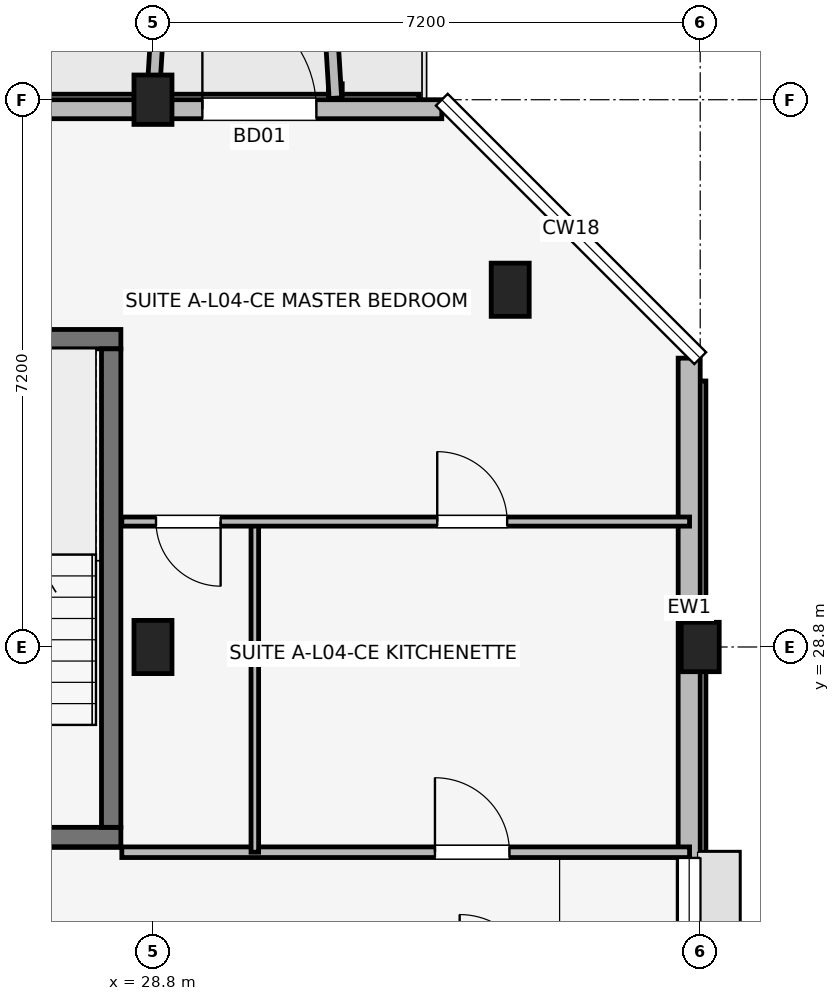
"""IFC4 building model, lengths in metres.
Left out: names, types, materials, properties, quantities, classifications, styles, units other than length and angle.
Written with IfcOpenShell. Run it as: python <this file> out.ifc"""

import sys

from ifc_helpers import new_model, si_unit, direction, frame, frame_2d, origin, origin_2d, place, context, subcontext, project, spatial, rectangle, extrude, element, fill, save


model = new_model("IFC4")
c1 = context("Model", 3, precision=1e-05, world=origin(), true_north=direction((0.0, 1.0)))
c2 = subcontext(c1, "Body", "Model", "MODEL_VIEW")
j1 = project(units=[si_unit("LENGTHUNIT", "METRE"), si_unit("PLANEANGLEUNIT", "RADIAN")], contexts=[c1])
p1 = place(None, origin())
s1 = spatial("IfcSite", under=j1, at=p1, CompositionType="ELEMENT")
p2 = place(p1, origin())
s2 = spatial("IfcBuilding", under=s1, at=p2, CompositionType="ELEMENT")
p3 = place(p2, frame((0.0, 0.0, 15.0)))
s3 = spatial("IfcBuildingStorey", under=s2, at=p3, CompositionType="ELEMENT", Elevation=15.0)
p4 = place(p3, frame((28.8, 28.8, 0.0), z_axis=(0.0, 0.0, 1.0), x_axis=(1.0, 0.0, 0.0)))
e1 = element("IfcColumn", 1, at=p4, inside=s3, PredefinedType="COLUMN", context=c2, shape_type="SweptSolid", body=[
    extrude(rectangle(XDim=0.5, YDim=0.7, at=origin_2d()), origin(), (0.0, 0.0, 1.0), 3.15),
])
for number, where, z_axis, x_axis in (
    (2, (28.8, 36.0, 0.0), (0.0, 0.0, 1.0), (1.0, 0.0, 0.0)),
    (3, (36.0, 28.8, 0.0), (0.0, 0.0, 1.0), (1.0, 0.0, 0.0)),
):
    element("IfcColumn", number, at=place(p3, frame(where, z_axis=z_axis, x_axis=x_axis)), inside=s3, PredefinedType="COLUMN", context=c2, shape_type="SweptSolid", body=[
        extrude(rectangle(XDim=0.5, YDim=0.65, at=origin_2d()), origin(), (0.0, 0.0, 1.0), 3.15),
    ])
p5 = place(p3, frame((33.5, 33.5, 0.0), z_axis=(0.0, 0.0, 1.0), x_axis=(1.0, 0.0, 0.0)))
e4 = element("IfcColumn", 4, at=p5, inside=s3, PredefinedType="COLUMN", context=c2, shape_type="SweptSolid", body=[
    extrude(rectangle(XDim=0.5, YDim=0.7, at=origin_2d()), origin(), (0.0, 0.0, 1.0), 3.15),
])
p6 = place(p3, frame((25.073, 26.3, 0.0), z_axis=(0.0, 0.0, 1.0), x_axis=(1.0, 0.0, 0.0)))
e5 = element("IfcWall", 5, at=p6, inside=s3, PredefinedType="SHEAR", context=c2, shape_type="SweptSolid", body=[
    extrude(rectangle(XDim=3.305, YDim=0.255, at=frame_2d((1.652, 0.0))), origin(), (0.0, 0.0, 1.0), 3.15),
])
p7 = place(p6, frame((1.127, 0.0, 0.0)))
e6 = element("IfcOpeningElement", 6, at=p7, cuts=e5, PredefinedType="OPENING", context=c2, shape_type="SweptSolid", body=[
    extrude(rectangle(XDim=1.05, YDim=2.12, at=frame_2d((0.525, 1.06))), frame((0.0, 0.137, 0.0), z_axis=(0.0, -1.0, 0.0), x_axis=(1.0, 0.0, 0.0)), (0.0, 0.0, 1.0), 0.275),
])
p8 = place(p3, frame((25.073, 32.85, 0.0), z_axis=(0.0, 0.0, 1.0), x_axis=(1.0, 0.0, 0.0)))
e7 = element("IfcWall", 7, at=p8, inside=s3, PredefinedType="SHEAR", context=c2, shape_type="SweptSolid", body=[
    extrude(rectangle(XDim=3.305, YDim=0.255, at=frame_2d((1.652, 0.0))), origin(), (0.0, 0.0, 1.0), 3.15),
])
p9 = place(p3, frame((28.25, 26.427, 0.0), z_axis=(0.0, 0.0, 1.0), x_axis=(0.0, 1.0, 0.0)))
e8 = element("IfcWall", 8, at=p9, inside=s3, PredefinedType="SHEAR", context=c2, shape_type="SweptSolid", body=[
    extrude(rectangle(XDim=6.295, YDim=0.255, at=frame_2d((3.147, 0.0))), origin(), (0.0, 0.0, 1.0), 3.15),
])
p10 = place(p3, frame((35.855, 17.8, 0.0), z_axis=(0.0, 0.0, 1.0), x_axis=(0.0, 1.0, 0.0)))
e9 = element("IfcWall", 9, at=p10, inside=s3, PredefinedType="SOLIDWALL", context=c2, shape_type="SweptSolid", body=[
    extrude(rectangle(XDim=14.8, YDim=0.29, at=frame_2d((7.4, 0.0))), origin(), (0.0, 0.0, 1.0), 2.38),
])
p11 = place(p10, frame((6.575, 0.0, 1.05)))
e10 = element("IfcOpeningElement", 10, at=p11, cuts=e9, PredefinedType="OPENING", context=c2, shape_type="SweptSolid", body=[
    extrude(rectangle(XDim=1.65, YDim=1.15, at=frame_2d((0.825, 0.575))), frame((0.0, 0.155, 0.0), z_axis=(0.0, -1.0, 0.0), x_axis=(1.0, 0.0, 0.0)), (0.0, 0.0, 1.0), 0.31),
])
p12 = place(p10, frame((0.84, 0.0, 0.72)))
e11 = element("IfcOpeningElement", 11, at=p12, cuts=e9, PredefinedType="OPENING", context=c2, shape_type="SweptSolid", body=[
    extrude(rectangle(XDim=1.3, YDim=1.55, at=frame_2d((0.65, 0.775))), frame((0.0, 0.155, 0.0), z_axis=(0.0, -1.0, 0.0), x_axis=(1.0, 0.0, 0.0)), (0.0, 0.0, 1.0), 0.31),
])
p13 = place(p3, frame((32.6, 35.875, 0.0), z_axis=(0.0, 0.0, 1.0), x_axis=(-1.0, 0.0, 0.0)))
e12 = element("IfcWall", 12, at=p13, inside=s3, PredefinedType="SOLIDWALL", context=c2, shape_type="SweptSolid", body=[
    extrude(rectangle(XDim=29.2, YDim=0.25, at=frame_2d((14.6, 0.0))), origin(), (0.0, 0.0, 1.0), 2.43),
])
p14 = place(p13, frame((27.55, 0.0, 0.0), z_axis=(0.0, 0.0, 1.0), x_axis=(-1.0, 0.0, 0.0)))
e13 = element("IfcOpeningElement", 13, at=p14, cuts=e12, PredefinedType="OPENING", context=c2, shape_type="SweptSolid", body=[
    extrude(rectangle(XDim=1.5, YDim=2.15, at=frame_2d((0.75, 1.075))), frame((0.0, 0.135, 0.0), z_axis=(0.0, -1.0, 0.0), x_axis=(1.0, 0.0, 0.0)), (0.0, 0.0, 1.0), 0.27),
])
p15 = place(p13, frame((3.15, 0.0, 0.0), z_axis=(0.0, 0.0, 1.0), x_axis=(-1.0, 0.0, 0.0)))
e14 = element("IfcOpeningElement", 14, at=p15, cuts=e12, PredefinedType="OPENING", context=c2, shape_type="SweptSolid", body=[
    extrude(rectangle(XDim=1.5, YDim=2.15, at=frame_2d((0.75, 1.075))), frame((0.0, 0.135, 0.0), z_axis=(0.0, -1.0, 0.0), x_axis=(1.0, 0.0, 0.0)), (0.0, 0.0, 1.0), 0.27),
])
p16 = place(p13, frame((14.15, 0.0, 0.5)))
e15 = element("IfcOpeningElement", 15, at=p16, cuts=e12, PredefinedType="OPENING", context=c2, shape_type="SweptSolid", body=[
    extrude(rectangle(XDim=0.9, YDim=1.8, at=frame_2d((0.45, 0.9))), frame((0.0, 0.135, 0.0), z_axis=(0.0, -1.0, 0.0), x_axis=(1.0, 0.0, 0.0)), (0.0, 0.0, 1.0), 0.27),
])
p17 = place(p13, frame((8.725, 0.0, 0.7)))
e16 = element("IfcOpeningElement", 16, at=p17, cuts=e12, PredefinedType="OPENING", context=c2, shape_type="SweptSolid", body=[
    extrude(rectangle(XDim=1.86, YDim=1.6, at=frame_2d((0.93, 0.8))), frame((0.0, 0.135, 0.0), z_axis=(0.0, -1.0, 0.0), x_axis=(1.0, 0.0, 0.0)), (0.0, 0.0, 1.0), 0.27),
])
p18 = place(p13, frame((18.755, 0.0, 0.7)))
e17 = element("IfcOpeningElement", 17, at=p18, cuts=e12, PredefinedType="OPENING", context=c2, shape_type="SweptSolid", body=[
    extrude(rectangle(XDim=1.58, YDim=1.6, at=frame_2d((0.79, 0.8))), frame((0.0, 0.135, 0.0), z_axis=(0.0, -1.0, 0.0), x_axis=(1.0, 0.0, 0.0)), (0.0, 0.0, 1.0), 0.27),
])
for number, where, z_axis, x_axis in (
    (18, (28.8, 36.02, 0.0), (0.0, 0.0, 1.0), (0.061, 0.998, 0.0)),
    (19, (31.2, 36.02, 0.0), (0.0, 0.0, 1.0), (-0.061, 0.998, 0.0)),
):
    element("IfcWall", number, at=place(p3, frame(where, z_axis=z_axis, x_axis=x_axis)), inside=s3, PredefinedType="ELEMENTEDWALL", context=c2, shape_type="SweptSolid", body=[
        extrude(rectangle(XDim=1.964, YDim=0.165, at=frame_2d((0.982, 0.0))), origin(), (0.0, 0.0, 1.0), 2.95),
    ])
p19 = place(p3, frame((28.39, 26.1, 0.0), z_axis=(0.0, 0.0, 1.0), x_axis=(1.0, 0.0, 0.0)))
e20 = element("IfcWall", 20, at=p19, inside=s3, PredefinedType="PARTITIONING", context=c2, shape_type="SweptSolid", body=[
    extrude(rectangle(XDim=7.47, YDim=0.14, at=frame_2d((3.735, 0.0))), origin(), (0.0, 0.0, 1.0), 2.38),
])
p20 = place(p19, frame((4.12, 0.0, 0.0)))
e21 = element("IfcOpeningElement", 21, at=p20, cuts=e20, PredefinedType="OPENING", context=c2, shape_type="SweptSolid", body=[
    extrude(rectangle(XDim=0.98, YDim=2.1, at=frame_2d((0.49, 1.05))), frame((0.0, 0.08, 0.0), z_axis=(0.0, -1.0, 0.0), x_axis=(1.0, 0.0, 0.0)), (0.0, 0.0, 1.0), 0.16),
])
p21 = place(p3, frame((30.14, 26.1, 0.0), z_axis=(0.0, 0.0, 1.0), x_axis=(0.0, 1.0, 0.0)))
e22 = element("IfcWall", 22, at=p21, inside=s3, PredefinedType="PARTITIONING", context=c2, shape_type="SweptSolid", body=[
    extrude(rectangle(XDim=4.35, YDim=0.1, at=frame_2d((2.175, 0.0))), origin(), (0.0, 0.0, 1.0), 2.375),
])
p22 = place(p3, frame((28.39, 30.45, 0.0), z_axis=(0.0, 0.0, 1.0), x_axis=(1.0, 0.0, 0.0)))
e23 = element("IfcWall", 23, at=p22, inside=s3, PredefinedType="PARTITIONING", context=c2, shape_type="SweptSolid", body=[
    extrude(rectangle(XDim=7.47, YDim=0.12, at=frame_2d((3.735, 0.0))), origin(), (0.0, 0.0, 1.0), 2.38),
])
p23 = place(p22, frame((1.3, 0.0, 0.0), z_axis=(0.0, 0.0, 1.0), x_axis=(-1.0, 0.0, 0.0)))
e24 = element("IfcOpeningElement", 24, at=p23, cuts=e23, PredefinedType="OPENING", context=c2, shape_type="SweptSolid", body=[
    extrude(rectangle(XDim=0.85, YDim=2.08, at=frame_2d((0.425, 1.04))), frame((0.0, 0.07, 0.0), z_axis=(0.0, -1.0, 0.0), x_axis=(1.0, 0.0, 0.0)), (0.0, 0.0, 1.0), 0.14),
])
p24 = place(p22, frame((4.15, 0.0, 0.0)))
e25 = element("IfcOpeningElement", 25, at=p24, cuts=e23, PredefinedType="OPENING", context=c2, shape_type="SweptSolid", body=[
    extrude(rectangle(XDim=0.92, YDim=2.08, at=frame_2d((0.46, 1.04))), frame((0.0, 0.07, 0.0), z_axis=(0.0, -1.0, 0.0), x_axis=(1.0, 0.0, 0.0)), (0.0, 0.0, 1.0), 0.14),
])
p25 = place(p15, origin())
e26 = element("IfcDoor", 26, at=p25, inside=s3, OperationType="SINGLE_SWING_RIGHT", PredefinedType="DOOR", context=c2, shape_type="SweptSolid", body=[
    extrude(rectangle(XDim=1.5, YDim=2.15, at=frame_2d((0.75, 1.075))), frame((0.0, 0.025, 0.0), z_axis=(0.0, -1.0, 0.0), x_axis=(1.0, 0.0, 0.0)), (0.0, 0.0, 1.0), 0.05),
])
fill(e14, e26)
p26 = place(p11, origin())
e27 = element("IfcWindow", 27, at=p26, inside=s3, PartitioningType="SINGLE_PANEL", PredefinedType="WINDOW", context=c2, shape_type="SweptSolid", body=[
    extrude(rectangle(XDim=1.65, YDim=1.15, at=frame_2d((0.825, 0.575))), frame((0.0, 0.03, 0.0), z_axis=(0.0, -1.0, 0.0), x_axis=(1.0, 0.0, 0.0)), (0.0, 0.0, 1.0), 0.06),
])
fill(e10, e27)
p27 = place(p20, origin())
e28 = element("IfcDoor", 28, at=p27, inside=s3, OperationType="SINGLE_SWING_LEFT", PredefinedType="DOOR", context=c2, shape_type="SweptSolid", body=[
    extrude(rectangle(XDim=0.98, YDim=2.1, at=frame_2d((0.49, 1.05))), frame((0.0, 0.025, 0.0), z_axis=(0.0, -1.0, 0.0), x_axis=(1.0, 0.0, 0.0)), (0.0, 0.0, 1.0), 0.05),
])
fill(e21, e28)
p28 = place(p23, origin())
e29 = element("IfcDoor", 29, at=p28, inside=s3, OperationType="SINGLE_SWING_RIGHT", PredefinedType="DOOR", context=c2, shape_type="SweptSolid", body=[
    extrude(rectangle(XDim=0.85, YDim=2.08, at=frame_2d((0.425, 1.04))), frame((0.0, 0.025, 0.0), z_axis=(0.0, -1.0, 0.0), x_axis=(1.0, 0.0, 0.0)), (0.0, 0.0, 1.0), 0.05),
])
fill(e24, e29)
p29 = place(p24, origin())
e30 = element("IfcDoor", 30, at=p29, inside=s3, OperationType="SINGLE_SWING_LEFT", PredefinedType="DOOR", context=c2, shape_type="SweptSolid", body=[
    extrude(rectangle(XDim=0.92, YDim=2.08, at=frame_2d((0.46, 1.04))), frame((0.0, 0.025, 0.0), z_axis=(0.0, -1.0, 0.0), x_axis=(1.0, 0.0, 0.0)), (0.0, 0.0, 1.0), 0.05),
])
fill(e25, e30)
save(model, sys.argv[1])
